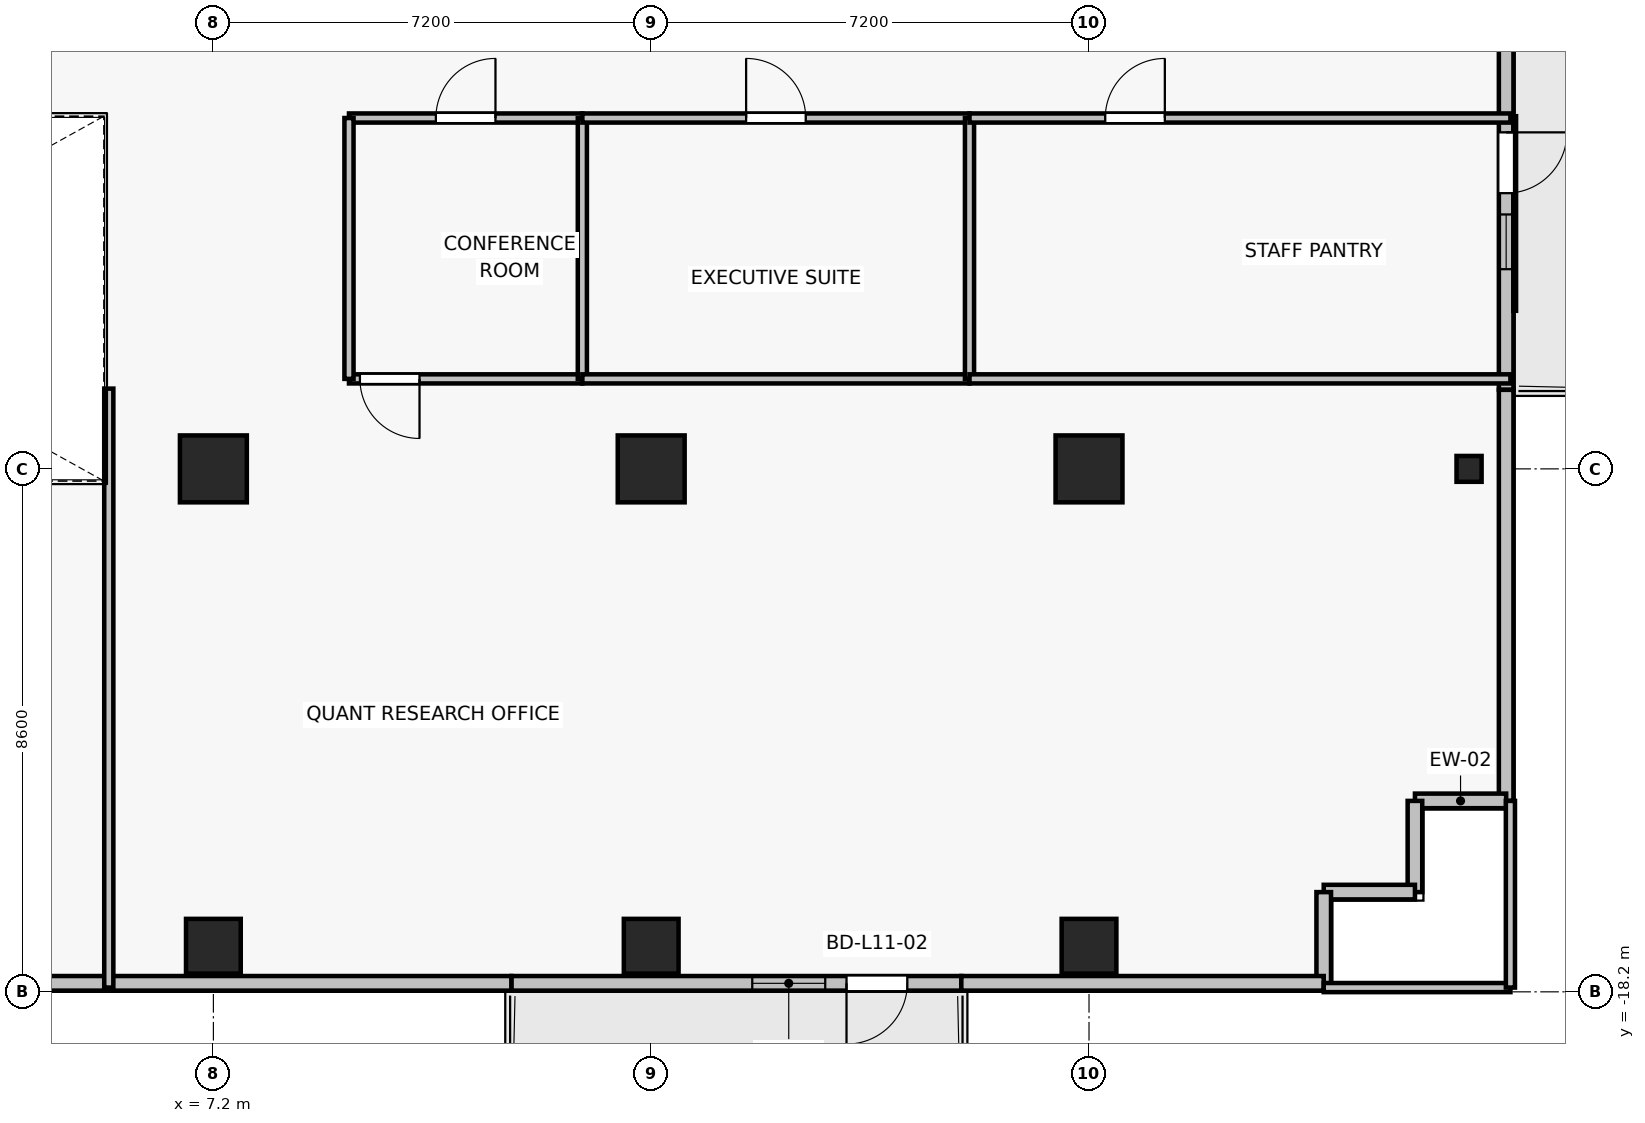
"""IFC4 building model, lengths in metres.
Left out: names, types, materials, properties, quantities, classifications, styles, units other than length and angle.
Written with IfcOpenShell. Run it as: python <this file> out.ifc"""

import sys

from ifc_helpers import new_model, si_unit, direction, frame, frame_2d, origin, origin_2d, place, context, subcontext, project, spatial, rectangle, i_section, extrude, source, transform, mapped, element, fill, save


model = new_model("IFC4")
c1 = context("Model", 3, precision=1e-05, world=origin(), true_north=direction((0.0, 1.0)))
c2 = subcontext(c1, "Body", "Model", "MODEL_VIEW")
j1 = project(units=[si_unit("LENGTHUNIT", "METRE"), si_unit("PLANEANGLEUNIT", "RADIAN")], contexts=[c1])
p1 = place(None, origin())
s1 = spatial("IfcSite", under=j1, at=p1, CompositionType="ELEMENT")
p2 = place(p1, origin())
s2 = spatial("IfcBuilding", under=s1, at=p2, CompositionType="ELEMENT")
p3 = place(p2, frame((0.0, 0.0, 43.9)))
s3 = spatial("IfcBuildingStorey", under=s2, at=p3, CompositionType="ELEMENT", Elevation=43.9)
for number, where, z_axis, x_axis in (
    (1, (7.2, -9.6, 0.0), (0.0, 0.0, 1.0), (1.0, 0.0, 0.0)),
    (2, (14.4, -9.6, 0.0), (0.0, 0.0, 1.0), (1.0, 0.0, 0.0)),
    (3, (21.6, -9.6, 0.0), (0.0, 0.0, 1.0), (1.0, 0.0, 0.0)),
):
    element("IfcColumn", number, at=place(p3, frame(where, z_axis=z_axis, x_axis=x_axis)), inside=s3, PredefinedType="COLUMN", context=c2, shape_type="SweptSolid", body=[
        extrude(rectangle(XDim=1.1, YDim=1.1, at=origin_2d()), origin(), (0.0, 0.0, 1.0), 3.3),
    ])
for number, where, z_axis, x_axis in (
    (4, (7.2, -17.45, 0.0), (0.0, 0.0, 1.0), (1.0, 0.0, 0.0)),
    (5, (14.4, -17.45, 0.0), (0.0, 0.0, 1.0), (1.0, 0.0, 0.0)),
    (6, (21.6, -17.45, 0.0), (0.0, 0.0, 1.0), (1.0, 0.0, 0.0)),
):
    element("IfcColumn", number, at=place(p3, frame(where, z_axis=z_axis, x_axis=x_axis)), inside=s3, PredefinedType="COLUMN", context=c2, shape_type="SweptSolid", body=[
        extrude(rectangle(XDim=0.9, YDim=0.9, at=origin_2d()), origin(), (0.0, 0.0, 1.0), 3.3),
    ])
p4 = place(p3, frame((27.85, -9.6, 0.0), z_axis=(0.0, 0.0, 1.0), x_axis=(1.0, 0.0, 0.0)))
e7 = element("IfcColumn", 7, at=p4, inside=s3, PredefinedType="COLUMN", context=c2, shape_type="SweptSolid", body=[
    extrude(i_section(OverallWidth=0.412, OverallDepth=0.425, WebThickness=0.026, FlangeThickness=0.039, FilletRadius=0.015, at=origin_2d()), origin(), (0.0, 0.0, 1.0), 3.3),
])
p5 = place(p3, frame((19.5, -18.06, 0.0), z_axis=(0.0, 0.0, 1.0), x_axis=(-1.0, 0.0, 0.0)))
e8 = element("IfcWall", 8, at=p5, inside=s3, PredefinedType="SOLIDWALL", context=c2, shape_type="SweptSolid", body=[
    extrude(rectangle(XDim=7.4, YDim=0.24, at=frame_2d((3.7, 0.0))), origin(), (0.0, 0.0, 1.0), 2.665),
])
p6 = place(p5, frame((0.888, 0.0, 0.0)))
e9 = element("IfcOpeningElement", 9, at=p6, cuts=e8, PredefinedType="OPENING", context=c2, shape_type="SweptSolid", body=[
    extrude(rectangle(XDim=1.0, YDim=2.2, at=frame_2d((0.5, 1.1))), frame((0.0, 0.13, 0.0), z_axis=(0.0, -1.0, 0.0), x_axis=(1.0, 0.0, 0.0)), (0.0, 0.0, 1.0), 0.26),
])
p7 = place(p5, frame((2.238, 0.0, 0.85)))
e10 = element("IfcOpeningElement", 10, at=p7, cuts=e8, PredefinedType="OPENING", context=c2, shape_type="SweptSolid", body=[
    extrude(rectangle(XDim=1.2, YDim=1.5, at=frame_2d((0.6, 0.75))), frame((0.0, 0.13, 0.0), z_axis=(0.0, -1.0, 0.0), x_axis=(1.0, 0.0, 0.0)), (0.0, 0.0, 1.0), 0.26),
])
p8 = place(p3, frame((28.46, -2.5, 0.0), z_axis=(0.0, 0.0, 1.0), x_axis=(0.0, -1.0, 0.0)))
e11 = element("IfcWall", 11, at=p8, inside=s3, PredefinedType="SOLIDWALL", context=c2, shape_type="SweptSolid", body=[
    extrude(rectangle(XDim=5.8, YDim=0.24, at=frame_2d((2.9, 0.0))), origin(), (0.0, 0.0, 1.0), 3.075),
])
p9 = place(p8, frame((1.566, 0.0, 0.0)))
e12 = element("IfcOpeningElement", 12, at=p9, cuts=e11, PredefinedType="OPENING", context=c2, shape_type="SweptSolid", body=[
    extrude(rectangle(XDim=1.0, YDim=2.2, at=frame_2d((0.5, 1.1))), frame((0.0, 0.13, 0.0), z_axis=(0.0, -1.0, 0.0), x_axis=(1.0, 0.0, 0.0)), (0.0, 0.0, 1.0), 0.26),
])
p10 = place(p8, frame((2.916, 0.0, 0.85)))
e13 = element("IfcOpeningElement", 13, at=p10, cuts=e11, PredefinedType="OPENING", context=c2, shape_type="SweptSolid", body=[
    extrude(rectangle(XDim=0.9, YDim=1.35, at=frame_2d((0.45, 0.675))), frame((0.0, 0.13, 0.0), z_axis=(0.0, -1.0, 0.0), x_axis=(1.0, 0.0, 0.0)), (0.0, 0.0, 1.0), 0.26),
])
p11 = place(p3, frame((28.46, -15.06, 0.0), z_axis=(0.0, 0.0, 1.0), x_axis=(0.0, 1.0, 0.0)))
e14 = element("IfcWall", 14, at=p11, inside=s3, PredefinedType="SOLIDWALL", context=c2, shape_type="SweptSolid", body=[
    extrude(rectangle(XDim=6.76, YDim=0.24, at=frame_2d((3.38, 0.0))), origin(), (0.0, 0.0, 1.0), 3.075),
])
for number, where, z_axis, x_axis in (
    (15, (26.96, -15.06, 0.0), (0.0, 0.0, 1.0), (1.0, 0.0, 0.0)),
    (16, (26.96, -16.56, 0.0), (0.0, 0.0, 1.0), (0.0, 1.0, 0.0)),
    (17, (25.46, -16.56, 0.0), (0.0, 0.0, 1.0), (1.0, 0.0, 0.0)),
    (18, (25.46, -18.06, 0.0), (0.0, 0.0, 1.0), (0.0, 1.0, 0.0)),
):
    element("IfcWall", number, at=place(p3, frame(where, z_axis=z_axis, x_axis=x_axis)), inside=s3, PredefinedType="SOLIDWALL", context=c2, shape_type="SweptSolid", body=[
        extrude(rectangle(XDim=1.5, YDim=0.24, at=frame_2d((0.75, 0.0))), origin(), (0.0, 0.0, 1.0), 3.075),
    ])
p12 = place(p3, frame((19.5, -18.06, 0.0), z_axis=(0.0, 0.0, 1.0), x_axis=(1.0, 0.0, 0.0)))
e19 = element("IfcWall", 19, at=p12, inside=s3, PredefinedType="SOLIDWALL", context=c2, shape_type="SweptSolid", body=[
    extrude(rectangle(XDim=5.96, YDim=0.24, at=frame_2d((2.98, 0.0))), origin(), (0.0, 0.0, 1.0), 2.665),
])
p13 = place(p3, frame((3.34, -18.06, 0.0), z_axis=(0.0, 0.0, 1.0), x_axis=(1.0, 0.0, 0.0)))
e20 = element("IfcWall", 20, at=p13, inside=s3, PredefinedType="SOLIDWALL", context=c2, shape_type="SweptSolid", body=[
    extrude(rectangle(XDim=8.76, YDim=0.24, at=frame_2d((4.38, 0.0))), origin(), (0.0, 0.0, 1.0), 3.075),
])
p14 = place(p3, frame((13.268, -8.12, 0.0), z_axis=(0.0, 0.0, 1.0), x_axis=(-1.0, 0.0, 0.0)))
e21 = element("IfcWall", 21, at=p14, inside=s3, PredefinedType="PARTITIONING", context=c2, shape_type="SweptSolid", body=[
    extrude(rectangle(XDim=3.838, YDim=0.15, at=frame_2d((1.919, 0.0))), origin(), (0.0, 0.0, 1.0), 3.075),
])
p15 = place(p14, frame((2.678, 0.0, 0.0)))
e22 = element("IfcOpeningElement", 22, at=p15, cuts=e21, PredefinedType="OPENING", context=c2, shape_type="SweptSolid", body=[
    extrude(rectangle(XDim=0.98, YDim=2.15, at=frame_2d((0.49, 1.075))), frame((0.0, 0.085, 0.0), z_axis=(0.0, -1.0, 0.0), x_axis=(1.0, 0.0, 0.0)), (0.0, 0.0, 1.0), 0.17),
])
p16 = place(p3, frame((9.43, -3.83, 0.0), z_axis=(0.0, 0.0, 1.0), x_axis=(1.0, 0.0, 0.0)))
e23 = element("IfcWall", 23, at=p16, inside=s3, PredefinedType="PARTITIONING", context=c2, shape_type="SweptSolid", body=[
    extrude(rectangle(XDim=3.838, YDim=0.15, at=frame_2d((1.919, 0.0))), origin(), (0.0, 0.0, 1.0), 3.075),
])
p17 = place(p16, frame((1.429, 0.0, 0.0)))
e24 = element("IfcOpeningElement", 24, at=p17, cuts=e23, PredefinedType="OPENING", context=c2, shape_type="SweptSolid", body=[
    extrude(rectangle(XDim=0.98, YDim=2.15, at=frame_2d((0.49, 1.075))), frame((0.0, 0.085, 0.0), z_axis=(0.0, -1.0, 0.0), x_axis=(1.0, 0.0, 0.0)), (0.0, 0.0, 1.0), 0.17),
])
for number, where, z_axis, x_axis in (
    (25, (9.43, -8.12, 0.0), (0.0, 0.0, 1.0), (0.0, 1.0, 0.0)),
    (26, (13.268, -3.83, 0.0), (0.0, 0.0, 1.0), (0.0, -1.0, 0.0)),
):
    element("IfcWall", number, at=place(p3, frame(where, z_axis=z_axis, x_axis=x_axis)), inside=s3, PredefinedType="PARTITIONING", context=c2, shape_type="SweptSolid", body=[
        extrude(rectangle(XDim=4.29, YDim=0.15, at=frame_2d((2.145, 0.0))), origin(), (0.0, 0.0, 1.0), 2.565),
    ])
p18 = place(p3, frame((19.635, -8.12, 0.0), z_axis=(0.0, 0.0, 1.0), x_axis=(-1.0, 0.0, 0.0)))
e27 = element("IfcWall", 27, at=p18, inside=s3, PredefinedType="PARTITIONING", context=c2, shape_type="SweptSolid", body=[
    extrude(rectangle(XDim=6.367, YDim=0.15, at=frame_2d((3.183, 0.0))), origin(), (0.0, 0.0, 1.0), 2.465),
])
p19 = place(p3, frame((13.268, -3.83, 0.0), z_axis=(0.0, 0.0, 1.0), x_axis=(1.0, 0.0, 0.0)))
e28 = element("IfcWall", 28, at=p19, inside=s3, PredefinedType="PARTITIONING", context=c2, shape_type="SweptSolid", body=[
    extrude(rectangle(XDim=6.367, YDim=0.15, at=frame_2d((3.183, 0.0))), origin(), (0.0, 0.0, 1.0), 2.465),
])
p20 = place(p19, frame((2.693, 0.0, 0.0)))
e29 = element("IfcOpeningElement", 29, at=p20, cuts=e28, PredefinedType="OPENING", context=c2, shape_type="SweptSolid", body=[
    extrude(rectangle(XDim=0.98, YDim=2.15, at=frame_2d((0.49, 1.075))), frame((0.0, 0.085, 0.0), z_axis=(0.0, -1.0, 0.0), x_axis=(1.0, 0.0, 0.0)), (0.0, 0.0, 1.0), 0.17),
])
p21 = place(p3, frame((19.635, -3.83, 0.0), z_axis=(0.0, 0.0, 1.0), x_axis=(0.0, -1.0, 0.0)))
e30 = element("IfcWall", 30, at=p21, inside=s3, PredefinedType="PARTITIONING", context=c2, shape_type="SweptSolid", body=[
    extrude(rectangle(XDim=4.29, YDim=0.15, at=frame_2d((2.145, 0.0))), origin(), (0.0, 0.0, 1.0), 2.565),
])
p22 = place(p3, frame((28.53, -8.12, 0.0), z_axis=(0.0, 0.0, 1.0), x_axis=(-1.0, 0.0, 0.0)))
e31 = element("IfcWall", 31, at=p22, inside=s3, PredefinedType="PARTITIONING", context=c2, shape_type="SweptSolid", body=[
    extrude(rectangle(XDim=8.895, YDim=0.15, at=frame_2d((4.448, 0.0))), origin(), (0.0, 0.0, 1.0), 2.465),
])
p23 = place(p3, frame((19.635, -3.83, 0.0), z_axis=(0.0, 0.0, 1.0), x_axis=(1.0, 0.0, 0.0)))
e32 = element("IfcWall", 32, at=p23, inside=s3, PredefinedType="PARTITIONING", context=c2, shape_type="SweptSolid", body=[
    extrude(rectangle(XDim=8.895, YDim=0.15, at=frame_2d((4.448, 0.0))), origin(), (0.0, 0.0, 1.0), 2.465),
])
p24 = place(p23, frame((2.232, 0.0, 0.0)))
e33 = element("IfcOpeningElement", 33, at=p24, cuts=e32, PredefinedType="OPENING", context=c2, shape_type="SweptSolid", body=[
    extrude(rectangle(XDim=0.98, YDim=2.15, at=frame_2d((0.49, 1.075))), frame((0.0, 0.085, 0.0), z_axis=(0.0, -1.0, 0.0), x_axis=(1.0, 0.0, 0.0)), (0.0, 0.0, 1.0), 0.17),
])
p25 = place(p3, frame((28.53, -18.13, 0.0), z_axis=(0.0, 0.0, 1.0), x_axis=(-1.0, 0.0, 0.0)))
e34 = element("IfcWall", 34, at=p25, inside=s3, PredefinedType="PARTITIONING", context=c2, shape_type="SweptSolid", body=[
    extrude(rectangle(XDim=3.07, YDim=0.15, at=frame_2d((1.535, 0.0))), origin(), (0.0, 0.0, 1.0), 2.665),
])
p26 = place(p3, frame((5.48, -18.13, 0.0), z_axis=(0.0, 0.0, 1.0), x_axis=(0.0, 1.0, 0.0)))
e35 = element("IfcWall", 35, at=p26, inside=s3, PredefinedType="PARTITIONING", context=c2, shape_type="SweptSolid", body=[
    extrude(rectangle(XDim=9.85, YDim=0.15, at=frame_2d((4.925, 0.0))), origin(), (0.0, 0.0, 1.0), 2.465),
])
p27 = place(p3, frame((28.53, -15.06, 0.0), z_axis=(0.0, 0.0, 1.0), x_axis=(0.0, -1.0, 0.0)))
e36 = element("IfcWall", 36, at=p27, inside=s3, PredefinedType="PARTITIONING", context=c2, shape_type="SweptSolid", body=[
    extrude(rectangle(XDim=3.07, YDim=0.15, at=frame_2d((1.535, 0.0))), origin(), (0.0, 0.0, 1.0), 3.075),
])
m1 = source(origin(), c2, "Body", "SweptSolid", [
    extrude(rectangle(XDim=1.0, YDim=2.2, at=frame_2d((0.5, 1.1))), frame((0.0, 0.025, 0.0), z_axis=(0.0, -1.0, 0.0), x_axis=(1.0, 0.0, 0.0)), (0.0, 0.0, 1.0), 0.05),
])
p28 = place(p6, origin())
e37 = element("IfcDoor", 37, at=p28, inside=s3, OperationType="SINGLE_SWING_RIGHT", PredefinedType="DOOR", context=c2, shape_type="MappedRepresentation", body=[
    mapped(m1, transform((0.0, 0.0, 0.0), x_axis=(1.0, 0.0, 0.0), y_axis=(0.0, 1.0, 0.0), z_axis=(0.0, 0.0, 1.0), scale=1.0)),
])
fill(e9, e37)
m2 = source(origin(), c2, "Body", "SweptSolid", [
    extrude(rectangle(XDim=1.2, YDim=1.5, at=frame_2d((0.6, 0.75))), frame((0.0, 0.03, 0.0), z_axis=(0.0, -1.0, 0.0), x_axis=(1.0, 0.0, 0.0)), (0.0, 0.0, 1.0), 0.06),
])
p29 = place(p7, origin())
e38 = element("IfcWindow", 38, at=p29, inside=s3, PartitioningType="SINGLE_PANEL", PredefinedType="WINDOW", context=c2, shape_type="MappedRepresentation", body=[
    mapped(m2, transform((0.0, 0.0, 0.0), x_axis=(1.0, 0.0, 0.0), y_axis=(0.0, 1.0, 0.0), z_axis=(0.0, 0.0, 1.0), scale=1.0)),
])
fill(e10, e38)
p30 = place(p9, origin())
e39 = element("IfcDoor", 39, at=p30, inside=s3, OperationType="SINGLE_SWING_LEFT", PredefinedType="DOOR", context=c2, shape_type="MappedRepresentation", body=[
    mapped(m1, transform((0.0, 0.0, 0.0), x_axis=(1.0, 0.0, 0.0), y_axis=(0.0, 1.0, 0.0), z_axis=(0.0, 0.0, 1.0), scale=1.0)),
])
fill(e12, e39)
m3 = source(origin(), c2, "Body", "SweptSolid", [
    extrude(rectangle(XDim=0.9, YDim=1.35, at=frame_2d((0.45, 0.675))), frame((0.0, 0.03, 0.0), z_axis=(0.0, -1.0, 0.0), x_axis=(1.0, 0.0, 0.0)), (0.0, 0.0, 1.0), 0.06),
])
p31 = place(p10, origin())
e40 = element("IfcWindow", 40, at=p31, inside=s3, PartitioningType="SINGLE_PANEL", PredefinedType="WINDOW", context=c2, shape_type="MappedRepresentation", body=[
    mapped(m3, transform((0.0, 0.0, 0.0), x_axis=(1.0, 0.0, 0.0), y_axis=(0.0, 1.0, 0.0), z_axis=(0.0, 0.0, 1.0), scale=1.0)),
])
fill(e13, e40)
m4 = source(origin(), c2, "Body", "SweptSolid", [
    extrude(rectangle(XDim=0.98, YDim=2.15, at=frame_2d((0.49, 1.075))), frame((0.0, 0.025, 0.0), z_axis=(0.0, -1.0, 0.0), x_axis=(1.0, 0.0, 0.0)), (0.0, 0.0, 1.0), 0.05),
])
p32 = place(p17, origin())
e41 = element("IfcDoor", 41, at=p32, inside=s3, OperationType="SINGLE_SWING_RIGHT", PredefinedType="DOOR", context=c2, shape_type="MappedRepresentation", body=[
    mapped(m4, transform((0.0, 0.0, 0.0), x_axis=(1.0, 0.0, 0.0), y_axis=(0.0, 1.0, 0.0), z_axis=(0.0, 0.0, 1.0), scale=1.0)),
])
fill(e24, e41)
p33 = place(p20, origin())
e42 = element("IfcDoor", 42, at=p33, inside=s3, OperationType="SINGLE_SWING_LEFT", PredefinedType="DOOR", context=c2, shape_type="MappedRepresentation", body=[
    mapped(m4, transform((0.0, 0.0, 0.0), x_axis=(1.0, 0.0, 0.0), y_axis=(0.0, 1.0, 0.0), z_axis=(0.0, 0.0, 1.0), scale=1.0)),
])
fill(e29, e42)
p34 = place(p24, origin())
e43 = element("IfcDoor", 43, at=p34, inside=s3, OperationType="SINGLE_SWING_RIGHT", PredefinedType="DOOR", context=c2, shape_type="MappedRepresentation", body=[
    mapped(m4, transform((0.0, 0.0, 0.0), x_axis=(1.0, 0.0, 0.0), y_axis=(0.0, 1.0, 0.0), z_axis=(0.0, 0.0, 1.0), scale=1.0)),
])
fill(e33, e43)
p35 = place(p15, origin())
e44 = element("IfcDoor", 44, at=p35, inside=s3, OperationType="SINGLE_SWING_LEFT", PredefinedType="DOOR", context=c2, shape_type="MappedRepresentation", body=[
    mapped(m4, transform((0.0, 0.0, 0.0), x_axis=(1.0, 0.0, 0.0), y_axis=(0.0, 1.0, 0.0), z_axis=(0.0, 0.0, 1.0), scale=1.0)),
])
fill(e22, e44)
save(model, sys.argv[1])
